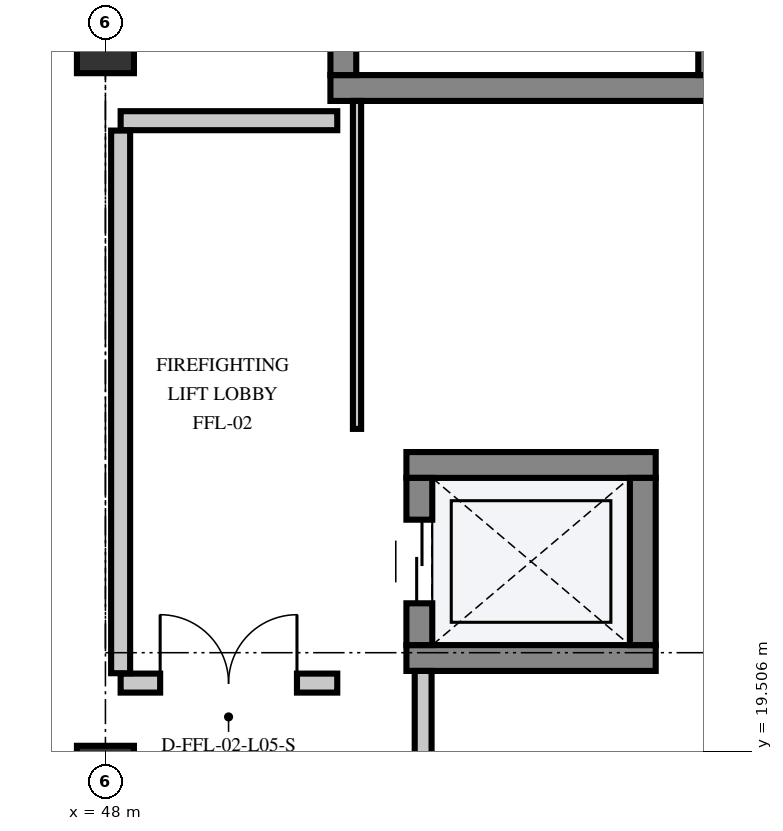
"""IFC4 building model, lengths in metres.
Left out: names, types, materials, properties, quantities, classifications, styles, units other than length and angle.
Written with IfcOpenShell. Run it as: python <this file> out.ifc"""

import sys

from ifc_helpers import new_model, si_unit, direction, frame, frame_2d, origin, origin_2d, place, context, subcontext, project, spatial, rectangle, extrude, element, fill, save


model = new_model("IFC4")
c1 = context("Model", 3, precision=1e-05, world=origin(), true_north=direction((0.0, 1.0)))
c2 = subcontext(c1, "Body", "Model", "MODEL_VIEW")
j1 = project(units=[si_unit("LENGTHUNIT", "METRE"), si_unit("PLANEANGLEUNIT", "RADIAN")], contexts=[c1])
p1 = place(None, origin())
s1 = spatial("IfcSite", under=j1, at=p1, CompositionType="ELEMENT")
p2 = place(p1, origin())
s2 = spatial("IfcBuilding", under=s1, at=p2, CompositionType="ELEMENT")
p3 = place(p2, frame((0.0, 0.0, 24.6)))
s3 = spatial("IfcBuildingStorey", under=s2, at=p3, CompositionType="ELEMENT", Elevation=24.6)
for number, where, z_axis, x_axis in (
    (1, (48.0, 19.2, 0.0), (0.0, 0.0, 1.0), (1.0, 0.0, 0.0)),
    (2, (48.0, 28.8, 0.0), (0.0, 0.0, 1.0), (1.0, 0.0, 0.0)),
):
    element("IfcColumn", number, at=place(p3, frame(where, z_axis=z_axis, x_axis=x_axis)), inside=s3, PredefinedType="COLUMN", context=c2, shape_type="SweptSolid", body=[
        extrude(rectangle(XDim=0.75, YDim=0.75, at=origin_2d()), origin(), (0.0, 0.0, 1.0), 4.8),
    ])
p4 = place(p3, frame((50.96, 28.23, 0.0), z_axis=(0.0, 0.0, 1.0), x_axis=(1.0, 0.0, 0.0)))
e3 = element("IfcWall", 3, at=p4, inside=s3, PredefinedType="SHEAR", context=c2, shape_type="SweptSolid", body=[
    extrude(rectangle(XDim=5.18, YDim=0.34, at=frame_2d((2.59, 0.0))), origin(), (0.0, 0.0, 1.0), 4.51),
])
p5 = place(p3, frame((55.97, 28.4, 0.0), z_axis=(0.0, 0.0, 1.0), x_axis=(0.0, 1.0, 0.0)))
e4 = element("IfcWall", 4, at=p5, inside=s3, PredefinedType="SHEAR", context=c2, shape_type="SweptSolid", body=[
    extrude(rectangle(XDim=8.8, YDim=0.34, at=frame_2d((4.4, 0.0))), origin(), (0.0, 0.0, 1.0), 4.51),
])
p6 = place(p3, frame((51.13, 28.4, 0.0), z_axis=(0.0, 0.0, 1.0), x_axis=(0.0, 1.0, 0.0)))
e5 = element("IfcWall", 5, at=p6, inside=s3, PredefinedType="SHEAR", context=c2, shape_type="SweptSolid", body=[
    extrude(rectangle(XDim=8.8, YDim=0.34, at=frame_2d((4.4, 0.0))), origin(), (0.0, 0.0, 1.0), 4.51),
])
p7 = place(p6, frame((0.45, 0.0, 0.0)))
e6 = element("IfcOpeningElement", 6, at=p7, cuts=e5, PredefinedType="OPENING", context=c2, shape_type="SweptSolid", body=[
    extrude(rectangle(XDim=1.35, YDim=2.2, at=frame_2d((0.675, 1.1))), frame((0.0, 0.182, 0.0), z_axis=(0.0, -1.0, 0.0), x_axis=(1.0, 0.0, 0.0)), (0.0, 0.0, 1.0), 0.364),
])
for number, where, z_axis, x_axis in (
    (7, (51.96, 20.73, 0.0), (0.0, 0.0, 1.0), (1.0, 0.0, 0.0)),
    (8, (51.96, 23.27, 0.0), (0.0, 0.0, 1.0), (1.0, 0.0, 0.0)),
):
    element("IfcWall", number, at=place(p3, frame(where, z_axis=z_axis, x_axis=x_axis)), inside=s3, PredefinedType="SHEAR", context=c2, shape_type="SweptSolid", body=[
        extrude(rectangle(XDim=3.28, YDim=0.34, at=frame_2d((1.64, 0.0))), origin(), (0.0, 0.0, 1.0), 4.51),
    ])
p8 = place(p3, frame((52.13, 20.9, 0.0), z_axis=(0.0, 0.0, 1.0), x_axis=(0.0, 1.0, 0.0)))
e9 = element("IfcWall", 9, at=p8, inside=s3, PredefinedType="SHEAR", context=c2, shape_type="SweptSolid", body=[
    extrude(rectangle(XDim=2.2, YDim=0.34, at=frame_2d((1.1, 0.0))), origin(), (0.0, 0.0, 1.0), 4.51),
])
p9 = place(p8, frame((0.55, 0.0, 0.0)))
e10 = element("IfcOpeningElement", 10, at=p9, cuts=e9, PredefinedType="OPENING", context=c2, shape_type="SweptSolid", body=[
    extrude(rectangle(XDim=1.1, YDim=2.15, at=frame_2d((0.55, 1.075))), frame((0.0, 0.182, 0.0), z_axis=(0.0, -1.0, 0.0), x_axis=(1.0, 0.0, 0.0)), (0.0, 0.0, 1.0), 0.364),
])
p10 = place(p3, frame((55.07, 20.9, 0.0), z_axis=(0.0, 0.0, 1.0), x_axis=(0.0, 1.0, 0.0)))
e11 = element("IfcWall", 11, at=p10, inside=s3, PredefinedType="SHEAR", context=c2, shape_type="SweptSolid", body=[
    extrude(rectangle(XDim=2.2, YDim=0.34, at=frame_2d((1.1, 0.0))), origin(), (0.0, 0.0, 1.0), 4.51),
])
p11 = place(p3, frame((48.2, 20.4, 0.0), z_axis=(0.0, 0.0, 1.0), x_axis=(1.0, 0.0, 0.0)))
e12 = element("IfcWall", 12, at=p11, inside=s3, PredefinedType="PARTITIONING", context=c2, shape_type="SweptSolid", body=[
    extrude(rectangle(XDim=2.85, YDim=0.25, at=frame_2d((1.425, 0.0))), origin(), (0.0, 0.0, 1.0), 3.45),
])
p12 = place(p11, frame((0.52, 0.0, 0.0)))
e13 = element("IfcOpeningElement", 13, at=p12, cuts=e12, PredefinedType="OPENING", context=c2, shape_type="SweptSolid", body=[
    extrude(rectangle(XDim=1.8, YDim=2.25, at=frame_2d((0.9, 1.125))), frame((0.0, 0.137, 0.0), z_axis=(0.0, -1.0, 0.0), x_axis=(1.0, 0.0, 0.0)), (0.0, 0.0, 1.0), 0.274),
])
p13 = place(p3, frame((48.2, 27.8, 0.0), z_axis=(0.0, 0.0, 1.0), x_axis=(1.0, 0.0, 0.0)))
e14 = element("IfcWall", 14, at=p13, inside=s3, PredefinedType="PARTITIONING", context=c2, shape_type="SweptSolid", body=[
    extrude(rectangle(XDim=2.85, YDim=0.25, at=frame_2d((1.425, 0.0))), origin(), (0.0, 0.0, 1.0), 3.45),
])
p14 = place(p3, frame((48.2, 20.53, 0.0), z_axis=(0.0, 0.0, 1.0), x_axis=(0.0, 1.0, 0.0)))
e15 = element("IfcWall", 15, at=p14, inside=s3, PredefinedType="PARTITIONING", context=c2, shape_type="SweptSolid", body=[
    extrude(rectangle(XDim=7.14, YDim=0.25, at=frame_2d((3.57, 0.0))), origin(), (0.0, 0.0, 1.0), 3.45),
])
p15 = place(p3, frame((51.31, 23.745, 0.0), z_axis=(0.0, 0.0, 1.0), x_axis=(0.0, 1.0, 0.0)))
e16 = element("IfcWall", 16, at=p15, inside=s3, PredefinedType="PARTITIONING", context=c2, shape_type="SweptSolid", body=[
    extrude(rectangle(XDim=4.315, YDim=0.108, at=frame_2d((2.158, 0.0))), origin(), (0.0, 0.0, 1.0), 4.51),
])
p16 = place(p3, frame((52.18, 15.04, 0.0), z_axis=(0.0, 0.0, 1.0), x_axis=(0.0, 1.0, 0.0)))
e17 = element("IfcWall", 17, at=p16, inside=s3, PredefinedType="PARTITIONING", context=c2, shape_type="SweptSolid", body=[
    extrude(rectangle(XDim=5.52, YDim=0.222, at=frame_2d((2.76, 0.0))), origin(), (0.0, 0.0, 1.0), 2.9),
])
p17 = place(p9, origin())
e18 = element("IfcDoor", 18, at=p17, inside=s3, OperationType="DOUBLE_DOOR_SLIDING", PredefinedType="DOOR", context=c2, shape_type="SweptSolid", body=[
    extrude(rectangle(XDim=1.1, YDim=2.15, at=frame_2d((0.55, 1.075))), frame((0.0, 0.025, 0.0), z_axis=(0.0, -1.0, 0.0), x_axis=(1.0, 0.0, 0.0)), (0.0, 0.0, 1.0), 0.05),
])
fill(e10, e18)
p18 = place(p12, origin())
e19 = element("IfcDoor", 19, at=p18, inside=s3, OperationType="DOUBLE_DOOR_SINGLE_SWING", PredefinedType="DOOR", context=c2, shape_type="SweptSolid", body=[
    extrude(rectangle(XDim=1.8, YDim=2.25, at=frame_2d((0.9, 1.125))), frame((0.0, 0.025, 0.0), z_axis=(0.0, -1.0, 0.0), x_axis=(1.0, 0.0, 0.0)), (0.0, 0.0, 1.0), 0.05),
])
fill(e13, e19)
save(model, sys.argv[1])
